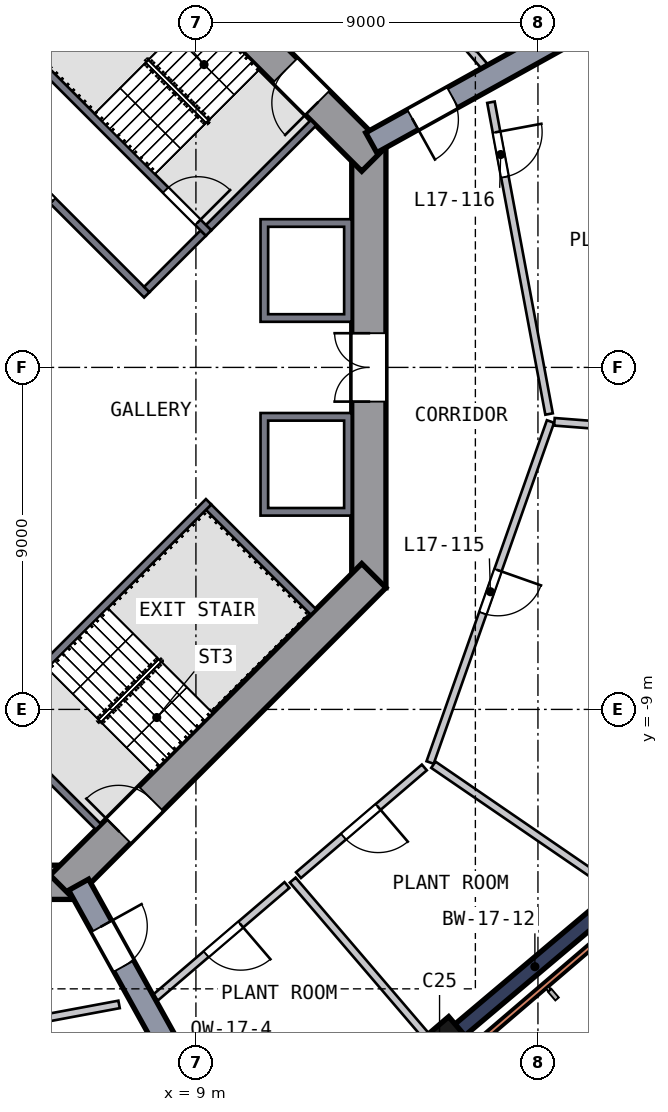
"""IFC4 building model, lengths in metres.
Left out: names, types, materials, properties, quantities, classifications, styles, units other than length and angle.
Written with IfcOpenShell. Run it as: python <this file> out.ifc"""

import sys

from ifc_helpers import new_model, si_unit, direction, frame, frame_2d, origin, origin_2d, place, context, subcontext, project, spatial, polyline, rectangle, outline, extrude, element, fill, save


model = new_model("IFC4")
c1 = context("Model", 3, precision=1e-05, world=origin(), true_north=direction((0.0, 1.0)))
c2 = subcontext(c1, "Body", "Model", "MODEL_VIEW")
j1 = project(units=[si_unit("LENGTHUNIT", "METRE"), si_unit("PLANEANGLEUNIT", "RADIAN")], contexts=[c1])
p1 = place(None, origin())
s1 = spatial("IfcSite", under=j1, at=p1, CompositionType="ELEMENT")
p2 = place(p1, origin())
s2 = spatial("IfcBuilding", under=s1, at=p2, CompositionType="ELEMENT")
p3 = place(p2, frame((0.0, 0.0, 75.0)))
s3 = spatial("IfcBuildingStorey", under=s2, at=p3, CompositionType="ELEMENT", Elevation=75.0)
p4 = place(p3, frame((15.351, -17.936, 0.0), z_axis=(0.049588704, 0.043146504, 0.997837331), x_axis=(0.758262845, 0.64862709, -0.065729414)))
e1 = element("IfcColumn", 1, at=p4, inside=s3, PredefinedType="COLUMN", context=c2, shape_type="SweptSolid", body=[
    extrude(rectangle(XDim=1.4, YDim=0.9, at=origin_2d()), origin(), (0.0, 0.0, 1.0), 4.51),
])
p5 = place(p3, frame((13.55, -5.799, 0.0), z_axis=(0.0, 0.0, 1.0), x_axis=(0.0, 1.0, 0.0)))
e2 = element("IfcWall", 2, at=p5, inside=s3, PredefinedType="SHEAR", context=c2, shape_type="SweptSolid", body=[
    extrude(rectangle(XDim=11.598, YDim=0.9, at=frame_2d((5.799, 0.0))), origin(), (0.0, 0.0, 1.0), 6.0),
])
p6 = place(p5, frame((4.899, 0.0, 0.0)))
e3 = element("IfcOpeningElement", 3, at=p6, cuts=e2, PredefinedType="OPENING", context=c2, shape_type="SweptSolid", body=[
    extrude(rectangle(XDim=1.8, YDim=2.1, at=frame_2d((0.9, 1.05))), frame((0.0, 0.46, 0.0), z_axis=(0.0, -1.0, 0.0), x_axis=(1.0, 0.0, 0.0)), (0.0, 0.0, 1.0), 0.92),
])
p7 = place(p3, frame((13.682, 5.481, 0.0), z_axis=(0.0, 0.0, 1.0), x_axis=(-0.707106781, 0.707106781, 0.0)))
e4 = element("IfcWall", 4, at=p7, inside=s3, PredefinedType="SHEAR", context=c2, shape_type="SweptSolid", body=[
    extrude(rectangle(XDim=11.598, YDim=0.9, at=frame_2d((5.799, 0.0))), origin(), (0.0, 0.0, 1.0), 6.0),
])
p8 = place(p7, frame((2.099, 0.0, 0.0)))
e5 = element("IfcOpeningElement", 5, at=p8, cuts=e4, PredefinedType="OPENING", context=c2, shape_type="SweptSolid", body=[
    extrude(rectangle(XDim=1.2, YDim=2.1, at=frame_2d((0.6, 1.05))), frame((0.0, 0.46, 0.0), z_axis=(0.0, -1.0, 0.0), x_axis=(1.0, 0.0, 0.0)), (0.0, 0.0, 1.0), 0.92),
])
p9 = place(p3, frame((-5.799, -13.55, 0.0), z_axis=(0.0, 0.0, 1.0), x_axis=(1.0, 0.0, 0.0)))
e6 = element("IfcWall", 6, at=p9, inside=s3, PredefinedType="SHEAR", context=c2, shape_type="SweptSolid", body=[
    extrude(rectangle(XDim=11.598, YDim=0.9, at=frame_2d((5.799, 0.0))), origin(), (0.0, 0.0, 1.0), 6.0),
])
p10 = place(p9, frame((4.899, 0.0, 0.0)))
e7 = element("IfcOpeningElement", 7, at=p10, cuts=e6, PredefinedType="OPENING", context=c2, shape_type="SweptSolid", body=[
    extrude(rectangle(XDim=1.8, YDim=2.1, at=frame_2d((0.9, 1.05))), frame((0.0, 0.46, 0.0), z_axis=(0.0, -1.0, 0.0), x_axis=(1.0, 0.0, 0.0)), (0.0, 0.0, 1.0), 0.92),
])
p11 = place(p3, frame((5.481, -13.682, 0.0), z_axis=(0.0, 0.0, 1.0), x_axis=(0.707106781, 0.707106781, 0.0)))
e8 = element("IfcWall", 8, at=p11, inside=s3, PredefinedType="SHEAR", context=c2, shape_type="SweptSolid", body=[
    extrude(rectangle(XDim=11.598, YDim=0.9, at=frame_2d((5.799, 0.0))), origin(), (0.0, 0.0, 1.0), 6.0),
])
p12 = place(p11, frame((2.099, 0.0, 0.0)))
e9 = element("IfcOpeningElement", 9, at=p12, cuts=e8, PredefinedType="OPENING", context=c2, shape_type="SweptSolid", body=[
    extrude(rectangle(XDim=1.2, YDim=2.1, at=frame_2d((0.6, 1.05))), frame((0.0, 0.46, 0.0), z_axis=(0.0, -1.0, 0.0), x_axis=(1.0, 0.0, 0.0)), (0.0, 0.0, 1.0), 0.92),
])
p13 = place(p3, frame((15.889, -17.482, 0.0), z_axis=(0.0, 0.0, 1.0), x_axis=(0.764448601, 0.64468468, 0.0)))
e10 = element("IfcWall", 10, at=p13, inside=s3, PredefinedType="SHEAR", context=c2, shape_type="SweptSolid", body=[
    extrude(rectangle(XDim=5.312, YDim=0.4, at=frame_2d((2.656, 0.0))), origin(), (0.0, 0.0, 1.0), 4.5),
])
p14 = place(p3, frame((5.913, -13.614, 0.0), z_axis=(0.0, 0.0, 1.0), x_axis=(0.485409605, -0.874286861, 0.0)))
e11 = element("IfcWall", 11, at=p14, inside=s3, PredefinedType="SHEAR", context=c2, shape_type="SweptSolid", body=[
    extrude(rectangle(XDim=8.885, YDim=0.6, at=frame_2d((4.442, 0.0))), origin(), (0.0, 0.0, 1.0), 4.5),
])
p15 = place(p14, frame((1.25, 0.0, 0.0)))
e12 = element("IfcOpeningElement", 12, at=p15, cuts=e11, PredefinedType="OPENING", context=c2, shape_type="SweptSolid", body=[
    extrude(rectangle(XDim=1.2, YDim=2.1, at=frame_2d((0.6, 1.05))), frame((0.0, 0.31, 0.0), z_axis=(0.0, -1.0, 0.0), x_axis=(1.0, 0.0, 0.0)), (0.0, 0.0, 1.0), 0.62),
])
p16 = place(p3, frame((13.614, 5.913, 0.0), z_axis=(0.0, 0.0, 1.0), x_axis=(0.874286861, 0.485409605, 0.0)))
e13 = element("IfcWall", 13, at=p16, inside=s3, PredefinedType="SHEAR", context=c2, shape_type="SweptSolid", body=[
    extrude(rectangle(XDim=8.885, YDim=0.6, at=frame_2d((4.442, 0.0))), origin(), (0.0, 0.0, 1.0), 4.5),
])
p17 = place(p16, frame((1.25, 0.0, 0.0)))
e14 = element("IfcOpeningElement", 14, at=p17, cuts=e13, PredefinedType="OPENING", context=c2, shape_type="SweptSolid", body=[
    extrude(rectangle(XDim=1.2, YDim=2.1, at=frame_2d((0.6, 1.05))), frame((0.0, 0.31, 0.0), z_axis=(0.0, -1.0, 0.0), x_axis=(1.0, 0.0, 0.0)), (0.0, 0.0, 1.0), 0.62),
])
p18 = place(p3, frame((10.787, -22.599, 0.0), z_axis=(0.0, 0.0, 1.0), x_axis=(0.759722997, 0.650246851, 0.0)))
e15 = element("IfcWall", 15, at=p18, inside=s3, PredefinedType="SOLIDWALL", context=c2, shape_type="SweptSolid", body=[
    extrude(rectangle(XDim=13.075, YDim=0.15, at=frame_2d((6.538, 0.0))), origin(), (0.0, 0.0, 1.0), 4.5),
])
p19 = place(p3, origin())
e16 = element("IfcWall", 16, at=p19, inside=s3, PredefinedType="SOLIDWALL", context=c2, shape_type="SweptSolid", body=[
    extrude(outline(polyline([(13.1, -1.2), (13.1, -3.9), (10.7, -3.9), (10.7, -1.2), (13.1, -1.2)]), holes=[polyline([(10.9, -3.7), (12.9, -3.7), (12.9, -1.4), (10.9, -1.4), (10.9, -3.7)])]), origin(), (0.0, 0.0, 1.0), 5.55),
])
p20 = place(p3, origin())
e17 = element("IfcWall", 17, at=p20, inside=s3, PredefinedType="SOLIDWALL", context=c2, shape_type="SweptSolid", body=[
    extrude(outline(polyline([(10.7, 3.9), (13.1, 3.9), (13.1, 1.2), (10.7, 1.2), (10.7, 3.9)]), holes=[polyline([(12.9, 1.4), (12.9, 3.7), (10.9, 3.7), (10.9, 1.4), (12.9, 1.4)])]), origin(), (0.0, 0.0, 1.0), 5.55),
])
p21 = place(p3, frame((3.535, 9.334, 0.0), z_axis=(0.0, 0.0, 1.0), x_axis=(0.707106781, -0.707106781, 0.0)))
e18 = element("IfcWall", 18, at=p21, inside=s3, PredefinedType="SOLIDWALL", context=c2, shape_type="SweptSolid", body=[
    extrude(rectangle(XDim=8.2, YDim=0.2, at=frame_2d((4.1, 0.0))), origin(), (0.0, 0.0, 1.0), 5.55),
])
p22 = place(p21, frame((6.6, 0.0, 0.0)))
e19 = element("IfcOpeningElement", 19, at=p22, cuts=e18, PredefinedType="OPENING", context=c2, shape_type="SweptSolid", body=[
    extrude(rectangle(XDim=1.2, YDim=2.1, at=frame_2d((0.6, 1.05))), frame((0.0, 0.11, 0.0), z_axis=(0.0, -1.0, 0.0), x_axis=(1.0, 0.0, 0.0)), (0.0, 0.0, 1.0), 0.22),
])
p23 = place(p3, frame((9.334, 3.677, 0.0), z_axis=(0.0, 0.0, 1.0), x_axis=(0.707106781, 0.707106781, 0.0)))
e20 = element("IfcWall", 20, at=p23, inside=s3, PredefinedType="SOLIDWALL", context=c2, shape_type="SweptSolid", body=[
    extrude(rectangle(XDim=3.9, YDim=0.2, at=frame_2d((1.95, 0.0))), origin(), (0.0, 0.0, 1.0), 5.55),
])
p24 = place(p3, frame((9.334, -3.535, 0.0), z_axis=(0.0, 0.0, 1.0), x_axis=(-0.707106781, -0.707106781, 0.0)))
e21 = element("IfcWall", 21, at=p24, inside=s3, PredefinedType="SOLIDWALL", context=c2, shape_type="SweptSolid", body=[
    extrude(rectangle(XDim=8.2, YDim=0.2, at=frame_2d((4.1, 0.0))), origin(), (0.0, 0.0, 1.0), 5.55),
])
p25 = place(p24, frame((6.6, 0.0, 0.0)))
e22 = element("IfcOpeningElement", 22, at=p25, cuts=e21, PredefinedType="OPENING", context=c2, shape_type="SweptSolid", body=[
    extrude(rectangle(XDim=1.2, YDim=2.1, at=frame_2d((0.6, 1.05))), frame((0.0, 0.11, 0.0), z_axis=(0.0, -1.0, 0.0), x_axis=(1.0, 0.0, 0.0)), (0.0, 0.0, 1.0), 0.22),
])
for number, where, z_axis, x_axis in (
    (23, (3.677, -9.334, 0.0), (0.0, 0.0, 1.0), (0.707, -0.707, 0.0)),
    (24, (9.334, -3.677, 0.0), (0.0, 0.0, 1.0), (0.707, -0.707, 0.0)),
):
    element("IfcWall", number, at=place(p3, frame(where, z_axis=z_axis, x_axis=x_axis)), inside=s3, PredefinedType="SOLIDWALL", context=c2, shape_type="SweptSolid", body=[
        extrude(rectangle(XDim=3.9, YDim=0.2, at=frame_2d((1.95, 0.0))), origin(), (0.0, 0.0, 1.0), 5.55),
    ])
p26 = place(p3, frame((7.708, 1.909, 0.0), z_axis=(0.0, 0.0, 1.0), x_axis=(-0.707106781, 0.707106781, 0.0)))
e25 = element("IfcWall", 25, at=p26, inside=s3, PredefinedType="SOLIDWALL", context=c2, shape_type="SweptSolid", body=[
    extrude(rectangle(XDim=8.2, YDim=0.2, at=frame_2d((4.1, 0.0))), origin(), (0.0, 0.0, 1.0), 5.55),
])
p27 = place(p26, frame((3.5, 0.0, 0.0)))
e26 = element("IfcOpeningElement", 26, at=p27, cuts=e25, PredefinedType="OPENING", context=c2, shape_type="SweptSolid", body=[
    extrude(rectangle(XDim=1.2, YDim=2.1, at=frame_2d((0.6, 1.05))), frame((0.0, 0.11, 0.0), z_axis=(0.0, -1.0, 0.0), x_axis=(1.0, 0.0, 0.0)), (0.0, 0.0, 1.0), 0.22),
])
p28 = place(p3, frame((7.708, 2.051, 0.0), z_axis=(0.0, 0.0, 1.0), x_axis=(0.707106781, 0.707106781, 0.0)))
e27 = element("IfcWall", 27, at=p28, inside=s3, PredefinedType="SOLIDWALL", context=c2, shape_type="SweptSolid", body=[
    extrude(rectangle(XDim=2.1, YDim=0.2, at=frame_2d((1.05, 0.0))), origin(), (0.0, 0.0, 1.0), 5.55),
])
p29 = place(p3, frame((3.451, -17.421, 0.0), z_axis=(0.0, 0.0, 1.0), x_axis=(0.983061962, 0.183273511, 0.0)))
e28 = element("IfcWall", 28, at=p29, inside=s3, PredefinedType="SOLIDWALL", context=c2, shape_type="SweptSolid", body=[
    extrude(rectangle(XDim=3.587, YDim=0.2, at=frame_2d((1.794, 0.0))), origin(), (0.0, 0.0, 1.0), 4.5),
])
p30 = place(p3, frame((11.395, -13.622, 0.0), z_axis=(0.0, 0.0, 1.0), x_axis=(-0.759729045, -0.650239785, 0.0)))
e29 = element("IfcWall", 29, at=p30, inside=s3, PredefinedType="SOLIDWALL", context=c2, shape_type="SweptSolid", body=[
    extrude(rectangle(XDim=4.558, YDim=0.2, at=frame_2d((2.279, 0.0))), origin(), (0.0, 0.0, 1.0), 4.5),
])
p31 = place(p30, frame((1.6, 0.0, 0.0)))
e30 = element("IfcOpeningElement", 30, at=p31, cuts=e29, PredefinedType="OPENING", context=c2, shape_type="SweptSolid", body=[
    extrude(rectangle(XDim=1.2, YDim=2.1, at=frame_2d((0.6, 1.05))), frame((0.0, 0.11, 0.0), z_axis=(0.0, -1.0, 0.0), x_axis=(1.0, 0.0, 0.0)), (0.0, 0.0, 1.0), 0.22),
])
p32 = place(p3, frame((15.01, -10.528, 0.0), z_axis=(0.0, 0.0, 1.0), x_axis=(-0.759742775, -0.650223742, 0.0)))
e31 = element("IfcWall", 31, at=p32, inside=s3, PredefinedType="SOLIDWALL", context=c2, shape_type="SweptSolid", body=[
    extrude(rectangle(XDim=4.358, YDim=0.2, at=frame_2d((2.179, 0.0))), origin(), (0.0, 0.0, 1.0), 4.5),
])
p33 = place(p32, frame((1.6, 0.0, 0.0)))
e32 = element("IfcOpeningElement", 32, at=p33, cuts=e31, PredefinedType="OPENING", context=c2, shape_type="SweptSolid", body=[
    extrude(rectangle(XDim=1.2, YDim=2.1, at=frame_2d((0.6, 1.05))), frame((0.0, 0.11, 0.0), z_axis=(0.0, -1.0, 0.0), x_axis=(1.0, 0.0, 0.0)), (0.0, 0.0, 1.0), 0.22),
])
p34 = place(p3, frame((11.547, -13.491, 0.0), z_axis=(0.0, 0.0, 1.0), x_axis=(0.650233927, -0.759734059, 0.0)))
e33 = element("IfcWall", 33, at=p34, inside=s3, PredefinedType="SOLIDWALL", context=c2, shape_type="SweptSolid", body=[
    extrude(rectangle(XDim=6.35, YDim=0.2, at=frame_2d((3.175, 0.0))), origin(), (0.0, 0.0, 1.0), 4.5),
])
p35 = place(p3, frame((10.801, 14.69, 0.0), z_axis=(0.0, 0.0, 1.0), x_axis=(0.650257786, -0.759713638, 0.0)))
e34 = element("IfcWall", 34, at=p35, inside=s3, PredefinedType="SOLIDWALL", context=c2, shape_type="SweptSolid", body=[
    extrude(rectangle(XDim=8.895, YDim=0.2, at=frame_2d((4.448, 0.0))), origin(), (0.0, 0.0, 1.0), 4.5),
])
p36 = place(p35, frame((5.9, 0.0, 0.0)))
e35 = element("IfcOpeningElement", 35, at=p36, cuts=e34, PredefinedType="OPENING", context=c2, shape_type="SweptSolid", body=[
    extrude(rectangle(XDim=1.2, YDim=2.1, at=frame_2d((0.6, 1.05))), frame((0.0, 0.11, 0.0), z_axis=(0.0, -1.0, 0.0), x_axis=(1.0, 0.0, 0.0)), (0.0, 0.0, 1.0), 0.22),
])
p37 = place(p3, frame((18.33, -1.423, 0.0), z_axis=(0.0, 0.0, 1.0), x_axis=(-0.332818776, -0.942990807, 0.0)))
e36 = element("IfcWall", 36, at=p37, inside=s3, PredefinedType="SOLIDWALL", context=c2, shape_type="SweptSolid", body=[
    extrude(rectangle(XDim=9.516, YDim=0.2, at=frame_2d((4.758, 0.0))), origin(), (0.0, 0.0, 1.0), 4.5),
])
p38 = place(p37, frame((4.15, 0.0, 0.0)))
e37 = element("IfcOpeningElement", 37, at=p38, cuts=e36, PredefinedType="OPENING", context=c2, shape_type="SweptSolid", body=[
    extrude(rectangle(XDim=1.2, YDim=2.1, at=frame_2d((0.6, 1.05))), frame((0.0, 0.11, 0.0), z_axis=(0.0, -1.0, 0.0), x_axis=(1.0, 0.0, 0.0)), (0.0, 0.0, 1.0), 0.22),
])
p39 = place(p3, frame((16.763, 6.978, 0.0), z_axis=(0.0, 0.0, 1.0), x_axis=(0.183272845, -0.983062086, 0.0)))
e38 = element("IfcWall", 38, at=p39, inside=s3, PredefinedType="SOLIDWALL", context=c2, shape_type="SweptSolid", body=[
    extrude(rectangle(XDim=8.346, YDim=0.2, at=frame_2d((4.173, 0.0))), origin(), (0.0, 0.0, 1.0), 4.5),
])
p40 = place(p39, frame((0.8, 0.0, 0.0)))
e39 = element("IfcOpeningElement", 39, at=p40, cuts=e38, PredefinedType="OPENING", context=c2, shape_type="SweptSolid", body=[
    extrude(rectangle(XDim=1.2, YDim=2.1, at=frame_2d((0.6, 1.05))), frame((0.0, 0.11, 0.0), z_axis=(0.0, -1.0, 0.0), x_axis=(1.0, 0.0, 0.0)), (0.0, 0.0, 1.0), 0.22),
])
p41 = place(p3, frame((15.248, -10.456, 0.0), z_axis=(0.0, 0.0, 1.0), x_axis=(0.824728852, -0.565528356, 0.0)))
e40 = element("IfcWall", 40, at=p41, inside=s3, PredefinedType="SOLIDWALL", context=c2, shape_type="SweptSolid", body=[
    extrude(rectangle(XDim=6.476, YDim=0.2, at=frame_2d((3.238, 0.0))), origin(), (0.0, 0.0, 1.0), 4.5),
])
p42 = place(p3, frame((18.433, -1.431, 0.0), z_axis=(0.0, 0.0, 1.0), x_axis=(0.9970028, -0.077365473, 0.0)))
e41 = element("IfcWall", 41, at=p42, inside=s3, PredefinedType="SOLIDWALL", context=c2, shape_type="SweptSolid", body=[
    extrude(rectangle(XDim=5.526, YDim=0.2, at=frame_2d((2.763, 0.0))), origin(), (0.0, 0.0, 1.0), 4.5),
])
p43 = place(p22, origin())
e42 = element("IfcDoor", 42, at=p43, inside=s3, OperationType="SINGLE_SWING_RIGHT", PredefinedType="DOOR", context=c2, shape_type="SweptSolid", body=[
    extrude(rectangle(XDim=1.2, YDim=2.1, at=frame_2d((0.6, 1.05))), frame((0.0, 0.025, 0.0), z_axis=(0.0, -1.0, 0.0), x_axis=(1.0, 0.0, 0.0)), (0.0, 0.0, 1.0), 0.05),
])
fill(e19, e42)
p44 = place(p6, origin())
e43 = element("IfcDoor", 43, at=p44, inside=s3, OperationType="DOUBLE_DOOR_SINGLE_SWING", PredefinedType="DOOR", context=c2, shape_type="SweptSolid", body=[
    extrude(rectangle(XDim=1.8, YDim=2.1, at=frame_2d((0.9, 1.05))), frame((0.0, 0.025, 0.0), z_axis=(0.0, -1.0, 0.0), x_axis=(1.0, 0.0, 0.0)), (0.0, 0.0, 1.0), 0.05),
])
fill(e3, e43)
p45 = place(p8, origin())
e44 = element("IfcDoor", 44, at=p45, inside=s3, OperationType="SINGLE_SWING_LEFT", PredefinedType="DOOR", context=c2, shape_type="SweptSolid", body=[
    extrude(rectangle(XDim=1.2, YDim=2.1, at=frame_2d((0.6, 1.05))), frame((0.0, 0.025, 0.0), z_axis=(0.0, -1.0, 0.0), x_axis=(1.0, 0.0, 0.0)), (0.0, 0.0, 1.0), 0.05),
])
fill(e5, e44)
p46 = place(p12, origin())
e45 = element("IfcDoor", 45, at=p46, inside=s3, OperationType="SINGLE_SWING_LEFT", PredefinedType="DOOR", context=c2, shape_type="SweptSolid", body=[
    extrude(rectangle(XDim=1.2, YDim=2.1, at=frame_2d((0.6, 1.05))), frame((0.0, 0.025, 0.0), z_axis=(0.0, -1.0, 0.0), x_axis=(1.0, 0.0, 0.0)), (0.0, 0.0, 1.0), 0.05),
])
fill(e9, e45)
p47 = place(p27, origin())
e46 = element("IfcDoor", 46, at=p47, inside=s3, OperationType="SINGLE_SWING_LEFT", PredefinedType="DOOR", context=c2, shape_type="SweptSolid", body=[
    extrude(rectangle(XDim=1.2, YDim=2.1, at=frame_2d((0.6, 1.05))), frame((0.0, 0.025, 0.0), z_axis=(0.0, -1.0, 0.0), x_axis=(1.0, 0.0, 0.0)), (0.0, 0.0, 1.0), 0.05),
])
fill(e26, e46)
p48 = place(p15, origin())
e47 = element("IfcDoor", 47, at=p48, inside=s3, OperationType="SINGLE_SWING_LEFT", PredefinedType="DOOR", context=c2, shape_type="SweptSolid", body=[
    extrude(rectangle(XDim=1.2, YDim=2.1, at=frame_2d((0.6, 1.05))), frame((0.0, 0.025, 0.0), z_axis=(0.0, -1.0, 0.0), x_axis=(1.0, 0.0, 0.0)), (0.0, 0.0, 1.0), 0.05),
])
fill(e12, e47)
p49 = place(p17, origin())
e48 = element("IfcDoor", 48, at=p49, inside=s3, OperationType="SINGLE_SWING_LEFT", PredefinedType="DOOR", context=c2, shape_type="SweptSolid", body=[
    extrude(rectangle(XDim=1.2, YDim=2.1, at=frame_2d((0.6, 1.05))), frame((0.0, 0.025, 0.0), z_axis=(0.0, -1.0, 0.0), x_axis=(1.0, 0.0, 0.0)), (0.0, 0.0, 1.0), 0.05),
])
fill(e14, e48)
p50 = place(p31, origin())
e49 = element("IfcDoor", 49, at=p50, inside=s3, OperationType="SINGLE_SWING_LEFT", PredefinedType="DOOR", context=c2, shape_type="SweptSolid", body=[
    extrude(rectangle(XDim=1.2, YDim=2.1, at=frame_2d((0.6, 1.05))), frame((0.0, 0.025, 0.0), z_axis=(0.0, -1.0, 0.0), x_axis=(1.0, 0.0, 0.0)), (0.0, 0.0, 1.0), 0.05),
])
fill(e30, e49)
p51 = place(p33, origin())
e50 = element("IfcDoor", 50, at=p51, inside=s3, OperationType="SINGLE_SWING_LEFT", PredefinedType="DOOR", context=c2, shape_type="SweptSolid", body=[
    extrude(rectangle(XDim=1.2, YDim=2.1, at=frame_2d((0.6, 1.05))), frame((0.0, 0.025, 0.0), z_axis=(0.0, -1.0, 0.0), x_axis=(1.0, 0.0, 0.0)), (0.0, 0.0, 1.0), 0.05),
])
fill(e32, e50)
p52 = place(p38, origin())
e51 = element("IfcDoor", 51, at=p52, inside=s3, OperationType="SINGLE_SWING_LEFT", PredefinedType="DOOR", context=c2, shape_type="SweptSolid", body=[
    extrude(rectangle(XDim=1.2, YDim=2.1, at=frame_2d((0.6, 1.05))), frame((0.0, 0.025, 0.0), z_axis=(0.0, -1.0, 0.0), x_axis=(1.0, 0.0, 0.0)), (0.0, 0.0, 1.0), 0.05),
])
fill(e37, e51)
p53 = place(p40, origin())
e52 = element("IfcDoor", 52, at=p53, inside=s3, OperationType="SINGLE_SWING_LEFT", PredefinedType="DOOR", context=c2, shape_type="SweptSolid", body=[
    extrude(rectangle(XDim=1.2, YDim=2.1, at=frame_2d((0.6, 1.05))), frame((0.0, 0.025, 0.0), z_axis=(0.0, -1.0, 0.0), x_axis=(1.0, 0.0, 0.0)), (0.0, 0.0, 1.0), 0.05),
])
fill(e39, e52)
save(model, sys.argv[1])
